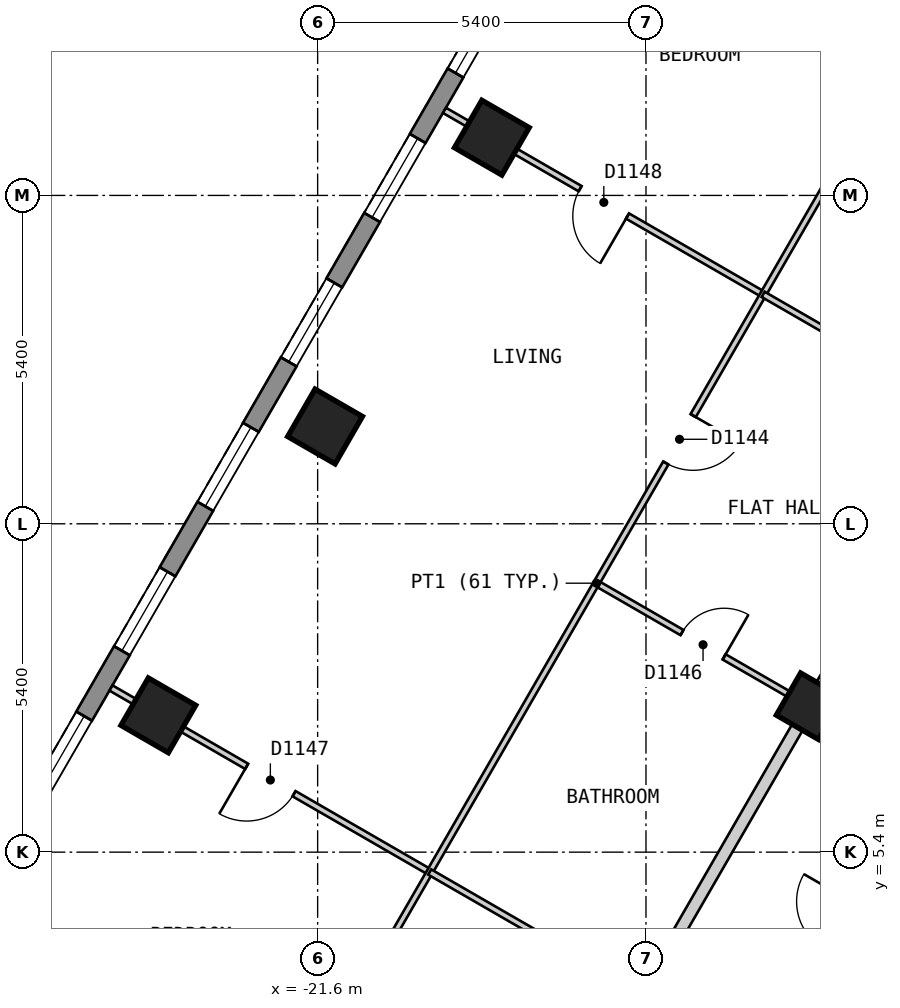
"""IFC4 building model, lengths in metres.
Left out: names, types, materials, properties, quantities, classifications, styles, units other than length and angle.
Written with IfcOpenShell. Run it as: python <this file> out.ifc"""

import sys

from ifc_helpers import new_model, si_unit, direction, frame, frame_2d, origin, origin_2d, place, context, subcontext, project, spatial, polyline, rectangle, outline, extrude, element, fill, save


model = new_model("IFC4")
c1 = context("Model", 3, precision=1e-05, world=origin(), true_north=direction((0.0, 1.0)))
c2 = subcontext(c1, "Body", "Model", "MODEL_VIEW")
j1 = project(units=[si_unit("LENGTHUNIT", "METRE"), si_unit("PLANEANGLEUNIT", "RADIAN")], contexts=[c1])
p1 = place(None, origin())
s1 = spatial("IfcSite", under=j1, at=p1, CompositionType="ELEMENT")
p2 = place(p1, origin())
s2 = spatial("IfcBuilding", under=s1, at=p2, CompositionType="ELEMENT")
p3 = place(p2, frame((0.0, 0.0, 138.6)))
s3 = spatial("IfcBuildingStorey", under=s2, at=p3, CompositionType="ELEMENT", Elevation=138.6)
for number, where, z_axis, x_axis in (
    (1, (-18.735, 17.15, 0.0), (0.0, 0.0, 1.0), (-0.5, -0.866, 0.0)),
    (2, (-21.478, 12.4, 0.0), (0.0, 0.0, 1.0), (-0.5, -0.866, 0.0)),
    (3, (-24.22, 7.65, 0.0), (0.0, 0.0, 1.0), (-0.5, -0.866, 0.0)),
):
    element("IfcColumn", number, at=place(p3, frame(where, z_axis=z_axis, x_axis=x_axis)), inside=s3, PredefinedType="COLUMN", context=c2, shape_type="SweptSolid", body=[
        extrude(rectangle(XDim=0.9, YDim=0.9, at=origin_2d()), origin(), (0.0, 0.0, 1.0), 3.0),
    ])
p4 = place(p3, frame((-13.51, 7.8, 0.0), z_axis=(0.0, 0.0, 1.0), x_axis=(-0.5, -0.866025403784, 0.0)))
e4 = element("IfcColumn", 4, at=p4, inside=s3, PredefinedType="COLUMN", context=c2, shape_type="SweptSolid", body=[
    extrude(rectangle(XDim=0.8, YDim=0.8, at=origin_2d()), origin(), (0.0, 0.0, 1.0), 3.0),
])
p5 = place(p3, frame((-16.555, 23.025, 0.0), z_axis=(0.0, 0.0, 1.0), x_axis=(-0.500020536353, -0.866013546791, 0.0)))
e5 = element("IfcWall", 5, at=p5, inside=s3, PredefinedType="SOLIDWALL", context=c2, shape_type="SweptSolid", body=[
    extrude(outline(polyline([(0.0, -0.15), (23.325, -0.15), (23.245, 0.15), (0.08, 0.15), (0.0, -0.15)])), origin(), (0.0, 0.0, 1.0), 2.7),
])
p6 = place(p5, frame((1.314, 0.0, 0.15)))
e6 = element("IfcOpeningElement", 6, at=p6, cuts=e5, PredefinedType="OPENING", context=c2, shape_type="SweptSolid", body=[
    extrude(rectangle(XDim=1.5, YDim=2.1, at=frame_2d((0.75, 1.05))), frame((0.0, 0.16, 0.0), z_axis=(0.0, -1.0, 0.0), x_axis=(1.0, 0.0, 0.0)), (0.0, 0.0, 1.0), 0.32),
])
p7 = place(p5, frame((4.056, 0.0, 0.15)))
e7 = element("IfcOpeningElement", 7, at=p7, cuts=e5, PredefinedType="OPENING", context=c2, shape_type="SweptSolid", body=[
    extrude(rectangle(XDim=1.5, YDim=2.1, at=frame_2d((0.75, 1.05))), frame((0.0, 0.16, 0.0), z_axis=(0.0, -1.0, 0.0), x_axis=(1.0, 0.0, 0.0)), (0.0, 0.0, 1.0), 0.32),
])
p8 = place(p5, frame((6.799, 0.0, 0.15)))
e8 = element("IfcOpeningElement", 8, at=p8, cuts=e5, PredefinedType="OPENING", context=c2, shape_type="SweptSolid", body=[
    extrude(rectangle(XDim=1.5, YDim=2.1, at=frame_2d((0.75, 1.05))), frame((0.0, 0.16, 0.0), z_axis=(0.0, -1.0, 0.0), x_axis=(1.0, 0.0, 0.0)), (0.0, 0.0, 1.0), 0.32),
])
p9 = place(p5, frame((9.541, 0.0, 0.15)))
e9 = element("IfcOpeningElement", 9, at=p9, cuts=e5, PredefinedType="OPENING", context=c2, shape_type="SweptSolid", body=[
    extrude(rectangle(XDim=1.5, YDim=2.1, at=frame_2d((0.75, 1.05))), frame((0.0, 0.16, 0.0), z_axis=(0.0, -1.0, 0.0), x_axis=(1.0, 0.0, 0.0)), (0.0, 0.0, 1.0), 0.32),
])
p10 = place(p5, frame((12.285, 0.0, 0.15)))
e10 = element("IfcOpeningElement", 10, at=p10, cuts=e5, PredefinedType="OPENING", context=c2, shape_type="SweptSolid", body=[
    extrude(rectangle(XDim=1.5, YDim=2.1, at=frame_2d((0.75, 1.05))), frame((0.0, 0.16, 0.0), z_axis=(0.0, -1.0, 0.0), x_axis=(1.0, 0.0, 0.0)), (0.0, 0.0, 1.0), 0.32),
])
p11 = place(p5, frame((15.027, 0.0, 0.15)))
e11 = element("IfcOpeningElement", 11, at=p11, cuts=e5, PredefinedType="OPENING", context=c2, shape_type="SweptSolid", body=[
    extrude(rectangle(XDim=1.5, YDim=2.1, at=frame_2d((0.75, 1.05))), frame((0.0, 0.16, 0.0), z_axis=(0.0, -1.0, 0.0), x_axis=(1.0, 0.0, 0.0)), (0.0, 0.0, 1.0), 0.32),
])
p12 = place(p5, frame((17.769, 0.0, 0.15)))
e12 = element("IfcOpeningElement", 12, at=p12, cuts=e5, PredefinedType="OPENING", context=c2, shape_type="SweptSolid", body=[
    extrude(rectangle(XDim=1.5, YDim=2.1, at=frame_2d((0.75, 1.05))), frame((0.0, 0.16, 0.0), z_axis=(0.0, -1.0, 0.0), x_axis=(1.0, 0.0, 0.0)), (0.0, 0.0, 1.0), 0.32),
])
p13 = place(p5, frame((20.512, 0.0, 0.15)))
e13 = element("IfcOpeningElement", 13, at=p13, cuts=e5, PredefinedType="OPENING", context=c2, shape_type="SweptSolid", body=[
    extrude(rectangle(XDim=1.5, YDim=2.1, at=frame_2d((0.75, 1.05))), frame((0.0, 0.16, 0.0), z_axis=(0.0, -1.0, 0.0), x_axis=(1.0, 0.0, 0.0)), (0.0, 0.0, 1.0), 0.32),
])
p14 = place(p3, frame((-15.242, 0.399, 0.0), z_axis=(0.0, 0.0, 1.0), x_axis=(0.499953615651, 0.866052182145, 0.0)))
e14 = element("IfcWall", 14, at=p14, inside=s3, PredefinedType="PARTITIONING", context=c2, shape_type="SweptSolid", body=[
    extrude(rectangle(XDim=8.777, YDim=0.2, at=frame_2d((4.388, 0.0))), origin(), (0.0, 0.0, 1.0), 2.7),
])
p15 = place(p14, frame((3.938, 0.0, 0.0)))
e15 = element("IfcOpeningElement", 15, at=p15, cuts=e14, PredefinedType="OPENING", context=c2, shape_type="SweptSolid", body=[
    extrude(rectangle(XDim=0.9, YDim=2.1, at=frame_2d((0.45, 1.05))), frame((0.0, 0.11, 0.0), z_axis=(0.0, -1.0, 0.0), x_axis=(1.0, 0.0, 0.0)), (0.0, 0.0, 1.0), 0.22),
])
p16 = place(p3, frame((-17.724, 0.5, 0.0), z_axis=(0.0, 0.0, 1.0), x_axis=(0.499992388462, 0.866029798263, 0.0)))
e16 = element("IfcWall", 16, at=p16, inside=s3, PredefinedType="PARTITIONING", context=c2, shape_type="SweptSolid", body=[
    extrude(rectangle(XDim=16.859, YDim=0.2, at=frame_2d((8.429, 0.0))), origin(), (0.0, 0.0, 1.0), 2.7),
])
p17 = place(p16, frame((10.672, 0.0, 0.0)))
e17 = element("IfcOpeningElement", 17, at=p17, cuts=e16, PredefinedType="OPENING", context=c2, shape_type="SweptSolid", body=[
    extrude(rectangle(XDim=1.0, YDim=2.1, at=frame_2d((0.5, 1.05))), frame((0.0, 0.11, 0.0), z_axis=(0.0, -1.0, 0.0), x_axis=(1.0, 0.0, 0.0)), (0.0, 0.0, 1.0), 0.22),
])
p18 = place(p3, frame((-24.999, 8.1, 0.0), z_axis=(0.0, 0.0, 1.0), x_axis=(0.865978029808, -0.500082045158, 0.0)))
e18 = element("IfcWall", 18, at=p18, inside=s3, PredefinedType="PARTITIONING", context=c2, shape_type="SweptSolid", body=[
    extrude(rectangle(XDim=6.053, YDim=0.1, at=frame_2d((3.027, 0.0))), origin(), (0.0, 0.0, 1.0), 2.7),
])
p19 = place(p18, frame((2.577, 0.0, 0.0)))
e19 = element("IfcOpeningElement", 19, at=p19, cuts=e18, PredefinedType="OPENING", context=c2, shape_type="SweptSolid", body=[
    extrude(rectangle(XDim=0.9, YDim=2.1, at=frame_2d((0.45, 1.05))), frame((0.0, 0.06, 0.0), z_axis=(0.0, -1.0, 0.0), x_axis=(1.0, 0.0, 0.0)), (0.0, 0.0, 1.0), 0.12),
])
p20 = place(p3, frame((-16.971, 9.798, 0.0), z_axis=(0.0, 0.0, 1.0), x_axis=(0.866087525071, -0.499892387336, 0.0)))
e20 = element("IfcWall", 20, at=p20, inside=s3, PredefinedType="PARTITIONING", context=c2, shape_type="SweptSolid", body=[
    extrude(rectangle(XDim=3.897, YDim=0.1, at=frame_2d((1.948, 0.0))), origin(), (0.0, 0.0, 1.0), 2.7),
])
p21 = place(p20, frame((1.574, 0.0, 0.0)))
e21 = element("IfcOpeningElement", 21, at=p21, cuts=e20, PredefinedType="OPENING", context=c2, shape_type="SweptSolid", body=[
    extrude(rectangle(XDim=0.8, YDim=2.1, at=frame_2d((0.4, 1.05))), frame((0.0, 0.06, 0.0), z_axis=(0.0, -1.0, 0.0), x_axis=(1.0, 0.0, 0.0)), (0.0, 0.0, 1.0), 0.12),
])
p22 = place(p3, frame((-19.514, 17.599, 0.0), z_axis=(0.0, 0.0, 1.0), x_axis=(0.866007554612, -0.500030914399, 0.0)))
e22 = element("IfcWall", 22, at=p22, inside=s3, PredefinedType="PARTITIONING", context=c2, shape_type="SweptSolid", body=[
    extrude(rectangle(XDim=6.052, YDim=0.1, at=frame_2d((3.026, 0.0))), origin(), (0.0, 0.0, 1.0), 2.7),
])
p23 = place(p22, frame((2.576, 0.0, 0.0)))
e23 = element("IfcOpeningElement", 23, at=p23, cuts=e22, PredefinedType="OPENING", context=c2, shape_type="SweptSolid", body=[
    extrude(rectangle(XDim=0.9, YDim=2.1, at=frame_2d((0.45, 1.05))), frame((0.0, 0.06, 0.0), z_axis=(0.0, -1.0, 0.0), x_axis=(1.0, 0.0, 0.0)), (0.0, 0.0, 1.0), 0.12),
])
p24 = place(p3, frame((-22.398, 0.499, 0.0), z_axis=(0.0, 0.0, 1.0), x_axis=(0.499981561717, 0.866036048871, 0.0)))
e24 = element("IfcWall", 24, at=p24, inside=s3, PredefinedType="PARTITIONING", context=c2, shape_type="SweptSolid", body=[
    extrude(rectangle(XDim=21.532, YDim=0.1, at=frame_2d((10.766, 0.0))), origin(), (0.0, 0.0, 1.0), 2.7),
])
p25 = place(p24, frame((13.049, 0.0, 0.0)))
e25 = element("IfcOpeningElement", 25, at=p25, cuts=e24, PredefinedType="OPENING", context=c2, shape_type="SweptSolid", body=[
    extrude(rectangle(XDim=0.9, YDim=2.1, at=frame_2d((0.45, 1.05))), frame((0.0, 0.06, 0.0), z_axis=(0.0, -1.0, 0.0), x_axis=(1.0, 0.0, 0.0)), (0.0, 0.0, 1.0), 0.12),
])
p26 = place(p24, frame((2.183, 0.0, 0.0)))
e26 = element("IfcOpeningElement", 26, at=p26, cuts=e24, PredefinedType="OPENING", context=c2, shape_type="SweptSolid", body=[
    extrude(rectangle(XDim=0.8, YDim=2.1, at=frame_2d((0.4, 1.05))), frame((0.0, 0.06, 0.0), z_axis=(0.0, -1.0, 0.0), x_axis=(1.0, 0.0, 0.0)), (0.0, 0.0, 1.0), 0.12),
])
p27 = place(p3, frame((-19.757, 5.073, 0.0), z_axis=(0.0, 0.0, 1.0), x_axis=(0.866076396086, -0.499911668341, 0.0)))
e27 = element("IfcWall", 27, at=p27, inside=s3, PredefinedType="PARTITIONING", context=c2, shape_type="SweptSolid", body=[
    extrude(rectangle(XDim=3.947, YDim=0.1, at=frame_2d((1.973, 0.0))), origin(), (0.0, 0.0, 1.0), 2.7),
])
p28 = place(p3, frame((-14.273, 14.573, 0.0), z_axis=(0.0, 0.0, 1.0), x_axis=(0.866138216955, -0.499804550929, 0.0)))
e28 = element("IfcWall", 28, at=p28, inside=s3, PredefinedType="PARTITIONING", context=c2, shape_type="SweptSolid", body=[
    extrude(rectangle(XDim=3.947, YDim=0.1, at=frame_2d((1.974, 0.0))), origin(), (0.0, 0.0, 1.0), 2.7),
])
p29 = place(p28, frame((1.574, 0.0, 0.0)))
e29 = element("IfcOpeningElement", 29, at=p29, cuts=e28, PredefinedType="OPENING", context=c2, shape_type="SweptSolid", body=[
    extrude(rectangle(XDim=0.9, YDim=2.1, at=frame_2d((0.45, 1.05))), frame((0.0, 0.06, 0.0), z_axis=(0.0, -1.0, 0.0), x_axis=(1.0, 0.0, 0.0)), (0.0, 0.0, 1.0), 0.12),
])
p30 = place(p7, origin())
e30 = element("IfcWindow", 30, at=p30, inside=s3, PartitioningType="SINGLE_PANEL", PredefinedType="WINDOW", context=c2, shape_type="SweptSolid", body=[
    extrude(rectangle(XDim=1.5, YDim=2.1, at=frame_2d((0.75, 1.05))), frame((0.0, 0.03, 0.0), z_axis=(0.0, -1.0, 0.0), x_axis=(1.0, 0.0, 0.0)), (0.0, 0.0, 1.0), 0.06),
])
fill(e7, e30)
p31 = place(p8, origin())
e31 = element("IfcWindow", 31, at=p31, inside=s3, PartitioningType="SINGLE_PANEL", PredefinedType="WINDOW", context=c2, shape_type="SweptSolid", body=[
    extrude(rectangle(XDim=1.5, YDim=2.1, at=frame_2d((0.75, 1.05))), frame((0.0, 0.03, 0.0), z_axis=(0.0, -1.0, 0.0), x_axis=(1.0, 0.0, 0.0)), (0.0, 0.0, 1.0), 0.06),
])
fill(e8, e31)
p32 = place(p9, origin())
e32 = element("IfcWindow", 32, at=p32, inside=s3, PartitioningType="SINGLE_PANEL", PredefinedType="WINDOW", context=c2, shape_type="SweptSolid", body=[
    extrude(rectangle(XDim=1.5, YDim=2.1, at=frame_2d((0.75, 1.05))), frame((0.0, 0.03, 0.0), z_axis=(0.0, -1.0, 0.0), x_axis=(1.0, 0.0, 0.0)), (0.0, 0.0, 1.0), 0.06),
])
fill(e9, e32)
p33 = place(p10, origin())
e33 = element("IfcWindow", 33, at=p33, inside=s3, PartitioningType="SINGLE_PANEL", PredefinedType="WINDOW", context=c2, shape_type="SweptSolid", body=[
    extrude(rectangle(XDim=1.5, YDim=2.1, at=frame_2d((0.75, 1.05))), frame((0.0, 0.03, 0.0), z_axis=(0.0, -1.0, 0.0), x_axis=(1.0, 0.0, 0.0)), (0.0, 0.0, 1.0), 0.06),
])
fill(e10, e33)
p34 = place(p11, origin())
e34 = element("IfcWindow", 34, at=p34, inside=s3, PartitioningType="SINGLE_PANEL", PredefinedType="WINDOW", context=c2, shape_type="SweptSolid", body=[
    extrude(rectangle(XDim=1.5, YDim=2.1, at=frame_2d((0.75, 1.05))), frame((0.0, 0.03, 0.0), z_axis=(0.0, -1.0, 0.0), x_axis=(1.0, 0.0, 0.0)), (0.0, 0.0, 1.0), 0.06),
])
fill(e11, e34)
p35 = place(p12, origin())
e35 = element("IfcWindow", 35, at=p35, inside=s3, PartitioningType="SINGLE_PANEL", PredefinedType="WINDOW", context=c2, shape_type="SweptSolid", body=[
    extrude(rectangle(XDim=1.5, YDim=2.1, at=frame_2d((0.75, 1.05))), frame((0.0, 0.03, 0.0), z_axis=(0.0, -1.0, 0.0), x_axis=(1.0, 0.0, 0.0)), (0.0, 0.0, 1.0), 0.06),
])
fill(e12, e35)
p36 = place(p25, origin())
e36 = element("IfcDoor", 36, at=p36, inside=s3, OperationType="SINGLE_SWING_RIGHT", PredefinedType="DOOR", context=c2, shape_type="SweptSolid", body=[
    extrude(rectangle(XDim=0.9, YDim=2.1, at=frame_2d((0.45, 1.05))), frame((0.0, 0.025, 0.0), z_axis=(0.0, -1.0, 0.0), x_axis=(1.0, 0.0, 0.0)), (0.0, 0.0, 1.0), 0.05),
])
fill(e25, e36)
p37 = place(p21, origin())
e37 = element("IfcDoor", 37, at=p37, inside=s3, OperationType="SINGLE_SWING_RIGHT", PredefinedType="DOOR", context=c2, shape_type="SweptSolid", body=[
    extrude(rectangle(XDim=0.8, YDim=2.1, at=frame_2d((0.4, 1.05))), frame((0.0, 0.025, 0.0), z_axis=(0.0, -1.0, 0.0), x_axis=(1.0, 0.0, 0.0)), (0.0, 0.0, 1.0), 0.05),
])
fill(e21, e37)
p38 = place(p19, origin())
e38 = element("IfcDoor", 38, at=p38, inside=s3, OperationType="SINGLE_SWING_LEFT", PredefinedType="DOOR", context=c2, shape_type="SweptSolid", body=[
    extrude(rectangle(XDim=0.9, YDim=2.1, at=frame_2d((0.45, 1.05))), frame((0.0, 0.025, 0.0), z_axis=(0.0, -1.0, 0.0), x_axis=(1.0, 0.0, 0.0)), (0.0, 0.0, 1.0), 0.05),
])
fill(e19, e38)
p39 = place(p23, origin())
e39 = element("IfcDoor", 39, at=p39, inside=s3, OperationType="SINGLE_SWING_RIGHT", PredefinedType="DOOR", context=c2, shape_type="SweptSolid", body=[
    extrude(rectangle(XDim=0.9, YDim=2.1, at=frame_2d((0.45, 1.05))), frame((0.0, 0.025, 0.0), z_axis=(0.0, -1.0, 0.0), x_axis=(1.0, 0.0, 0.0)), (0.0, 0.0, 1.0), 0.05),
])
fill(e23, e39)
save(model, sys.argv[1])
